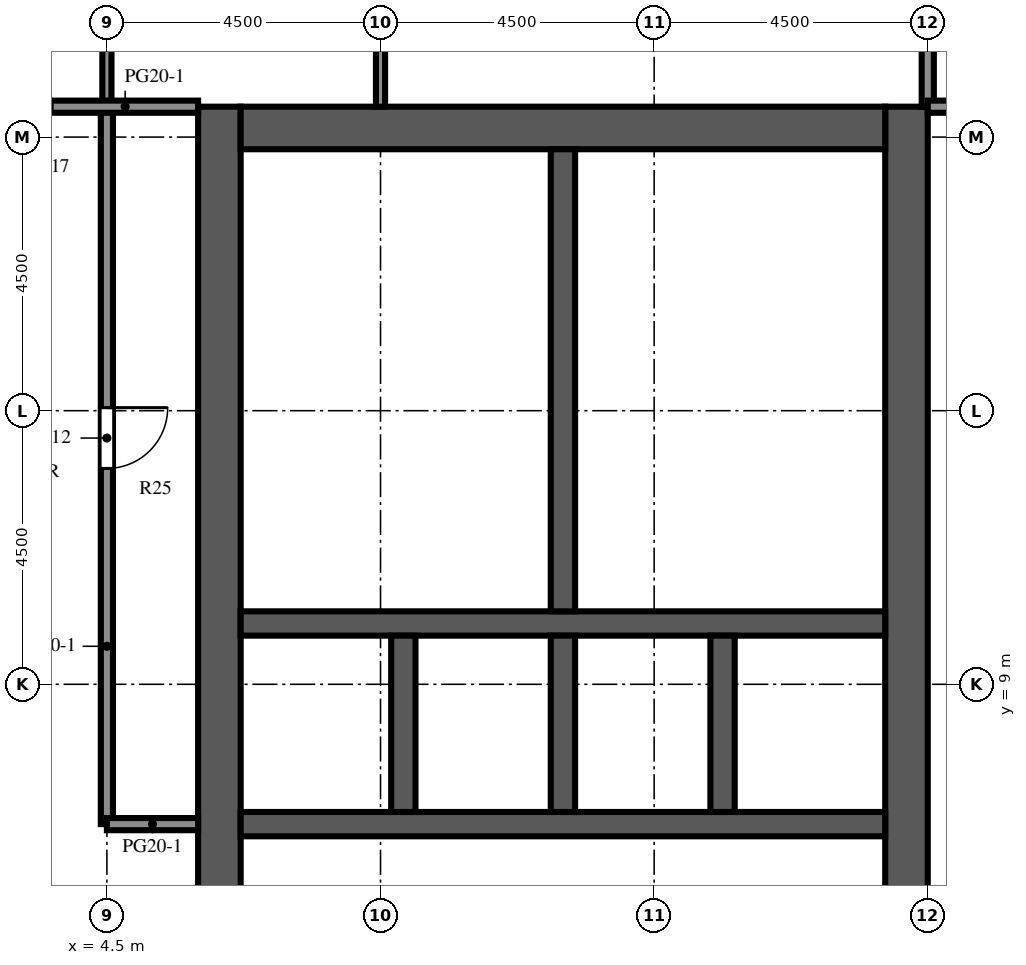
"""IFC4 building model, lengths in metres.
Left out: names, types, materials, properties, quantities, classifications, styles, units other than length and angle.
Written with IfcOpenShell. Run it as: python <this file> out.ifc"""

import sys

from ifc_helpers import new_model, si_unit, direction, frame, frame_2d, origin, place, context, subcontext, project, spatial, rectangle, extrude, element, fill, save


model = new_model("IFC4")
c1 = context("Model", 3, precision=1e-05, world=origin(), true_north=direction((0.0, 1.0)))
c2 = subcontext(c1, "Body", "Model", "MODEL_VIEW")
j1 = project(units=[si_unit("LENGTHUNIT", "METRE"), si_unit("PLANEANGLEUNIT", "RADIAN")], contexts=[c1])
p1 = place(None, origin())
s1 = spatial("IfcSite", under=j1, at=p1, CompositionType="ELEMENT")
p2 = place(p1, origin())
s2 = spatial("IfcBuilding", under=s1, at=p2, CompositionType="ELEMENT")
p3 = place(p2, frame((0.0, 0.0, 266.3)))
s3 = spatial("IfcBuildingStorey", under=s2, at=p3, CompositionType="ELEMENT", Elevation=266.3)
p4 = place(p3, frame((6.35, -9.0, 0.0), z_axis=(0.0, 0.0, 1.0), x_axis=(0.0, 1.0, 0.0)))
e1 = element("IfcWall", 1, at=p4, inside=s3, PredefinedType="SHEAR", context=c2, shape_type="SweptSolid", body=[
    extrude(rectangle(XDim=27.5, YDim=0.7, at=frame_2d((13.75, 0.0))), origin(), (0.0, 0.0, 1.0), 4.1),
])
p5 = place(p4, frame((12.55, 0.0, 0.0)))
e2 = element("IfcOpeningElement", 2, at=p5, cuts=e1, PredefinedType="OPENING", context=c2, shape_type="SweptSolid", body=[
    extrude(rectangle(XDim=2.4, YDim=2.4, at=frame_2d((1.2, 1.2))), frame((0.0, 0.36, 0.0), z_axis=(0.0, -1.0, 0.0), x_axis=(1.0, 0.0, 0.0)), (0.0, 0.0, 1.0), 0.72),
])
p6 = place(p4, frame((3.788, 0.0, 0.0)))
e3 = element("IfcOpeningElement", 3, at=p6, cuts=e1, PredefinedType="OPENING", context=c2, shape_type="SweptSolid", body=[
    extrude(rectangle(XDim=0.968, YDim=2.1, at=frame_2d((0.484, 1.05))), frame((0.0, 0.36, 0.0), z_axis=(0.0, -1.0, 0.0), x_axis=(1.0, 0.0, 0.0)), (0.0, 0.0, 1.0), 0.72),
])
p7 = place(p4, frame((23.54, 0.0, 0.0)))
e4 = element("IfcOpeningElement", 4, at=p7, cuts=e1, PredefinedType="OPENING", context=c2, shape_type="SweptSolid", body=[
    extrude(rectangle(XDim=1.2, YDim=2.1, at=frame_2d((0.6, 1.05))), frame((0.0, 0.36, 0.0), z_axis=(0.0, -1.0, 0.0), x_axis=(1.0, 0.0, 0.0)), (0.0, 0.0, 1.0), 0.72),
])
p8 = place(p3, frame((17.65, -9.0, 0.0), z_axis=(0.0, 0.0, 1.0), x_axis=(0.0, 1.0, 0.0)))
e5 = element("IfcWall", 5, at=p8, inside=s3, PredefinedType="SHEAR", context=c2, shape_type="SweptSolid", body=[
    extrude(rectangle(XDim=27.5, YDim=0.7, at=frame_2d((13.75, 0.0))), origin(), (0.0, 0.0, 1.0), 4.1),
])
p9 = place(p8, frame((12.55, 0.0, 0.0)))
e6 = element("IfcOpeningElement", 6, at=p9, cuts=e5, PredefinedType="OPENING", context=c2, shape_type="SweptSolid", body=[
    extrude(rectangle(XDim=2.4, YDim=2.4, at=frame_2d((1.2, 1.2))), frame((0.0, 0.36, 0.0), z_axis=(0.0, -1.0, 0.0), x_axis=(1.0, 0.0, 0.0)), (0.0, 0.0, 1.0), 0.72),
])
p10 = place(p8, frame((6.825, 0.0, 0.0)))
e7 = element("IfcOpeningElement", 7, at=p10, cuts=e5, PredefinedType="OPENING", context=c2, shape_type="SweptSolid", body=[
    extrude(rectangle(XDim=1.2, YDim=2.1, at=frame_2d((0.6, 1.05))), frame((0.0, 0.36, 0.0), z_axis=(0.0, -1.0, 0.0), x_axis=(1.0, 0.0, 0.0)), (0.0, 0.0, 1.0), 0.72),
])
p11 = place(p8, frame((19.475, 0.0, 0.0)))
e8 = element("IfcOpeningElement", 8, at=p11, cuts=e5, PredefinedType="OPENING", context=c2, shape_type="SweptSolid", body=[
    extrude(rectangle(XDim=1.2, YDim=2.1, at=frame_2d((0.6, 1.05))), frame((0.0, 0.36, 0.0), z_axis=(0.0, -1.0, 0.0), x_axis=(1.0, 0.0, 0.0)), (0.0, 0.0, 1.0), 0.72),
])
p12 = place(p3, frame((6.7, 18.15, 0.0), z_axis=(0.0, 0.0, 1.0), x_axis=(1.0, 0.0, 0.0)))
e9 = element("IfcWall", 9, at=p12, inside=s3, PredefinedType="SHEAR", context=c2, shape_type="SweptSolid", body=[
    extrude(rectangle(XDim=10.6, YDim=0.7, at=frame_2d((5.3, 0.0))), origin(), (0.0, 0.0, 1.0), 4.1),
])
p13 = place(p3, frame((6.7, 6.7, 0.0), z_axis=(0.0, 0.0, 1.0), x_axis=(1.0, 0.0, 0.0)))
e10 = element("IfcWall", 10, at=p13, inside=s3, PredefinedType="SHEAR", context=c2, shape_type="SweptSolid", body=[
    extrude(rectangle(XDim=10.6, YDim=0.4, at=frame_2d((5.3, 0.0))), origin(), (0.0, 0.0, 1.0), 4.1),
])
p14 = place(p13, frame((3.438, 0.0, 0.0)))
e11 = element("IfcOpeningElement", 11, at=p14, cuts=e10, PredefinedType="OPENING", context=c2, shape_type="SweptSolid", body=[
    extrude(rectangle(XDim=1.1, YDim=2.1, at=frame_2d((0.55, 1.05))), frame((0.0, 0.21, 0.0), z_axis=(0.0, -1.0, 0.0), x_axis=(1.0, 0.0, 0.0)), (0.0, 0.0, 1.0), 0.42),
])
p15 = place(p13, frame((6.062, 0.0, 0.0)))
e12 = element("IfcOpeningElement", 12, at=p15, cuts=e10, PredefinedType="OPENING", context=c2, shape_type="SweptSolid", body=[
    extrude(rectangle(XDim=1.1, YDim=2.1, at=frame_2d((0.55, 1.05))), frame((0.0, 0.21, 0.0), z_axis=(0.0, -1.0, 0.0), x_axis=(1.0, 0.0, 0.0)), (0.0, 0.0, 1.0), 0.42),
])
p16 = place(p13, frame((8.812, 0.0, 0.0)))
e13 = element("IfcOpeningElement", 13, at=p16, cuts=e10, PredefinedType="OPENING", context=c2, shape_type="SweptSolid", body=[
    extrude(rectangle(XDim=1.1, YDim=2.1, at=frame_2d((0.55, 1.05))), frame((0.0, 0.21, 0.0), z_axis=(0.0, -1.0, 0.0), x_axis=(1.0, 0.0, 0.0)), (0.0, 0.0, 1.0), 0.42),
])
p17 = place(p13, frame((0.738, 0.0, 0.0)))
e14 = element("IfcOpeningElement", 14, at=p17, cuts=e10, PredefinedType="OPENING", context=c2, shape_type="SweptSolid", body=[
    extrude(rectangle(XDim=1.0, YDim=2.1, at=frame_2d((0.5, 1.05))), frame((0.0, 0.21, 0.0), z_axis=(0.0, -1.0, 0.0), x_axis=(1.0, 0.0, 0.0)), (0.0, 0.0, 1.0), 0.42),
])
p18 = place(p3, frame((6.7, 10.0, 0.0), z_axis=(0.0, 0.0, 1.0), x_axis=(1.0, 0.0, 0.0)))
e15 = element("IfcWall", 15, at=p18, inside=s3, PredefinedType="SHEAR", context=c2, shape_type="SweptSolid", body=[
    extrude(rectangle(XDim=10.6, YDim=0.4, at=frame_2d((5.3, 0.0))), origin(), (0.0, 0.0, 1.0), 4.1),
])
for number, where, z_axis, x_axis in (
    (16, (9.375, 6.9, 0.0), (0.0, 0.0, 1.0), (0.0, 1.0, 0.0)),
    (17, (12.0, 6.9, 0.0), (0.0, 0.0, 1.0), (0.0, 1.0, 0.0)),
    (18, (14.625, 6.9, 0.0), (0.0, 0.0, 1.0), (0.0, 1.0, 0.0)),
):
    element("IfcWall", number, at=place(p3, frame(where, z_axis=z_axis, x_axis=x_axis)), inside=s3, PredefinedType="SHEAR", context=c2, shape_type="SweptSolid", body=[
        extrude(rectangle(XDim=2.9, YDim=0.4, at=frame_2d((1.45, 0.0))), origin(), (0.0, 0.0, 1.0), 4.1),
    ])
p19 = place(p3, frame((12.0, 10.2, 0.0), z_axis=(0.0, 0.0, 1.0), x_axis=(0.0, 1.0, 0.0)))
e19 = element("IfcWall", 19, at=p19, inside=s3, PredefinedType="SHEAR", context=c2, shape_type="SweptSolid", body=[
    extrude(rectangle(XDim=7.6, YDim=0.4, at=frame_2d((3.8, 0.0))), origin(), (0.0, 0.0, 1.0), 4.1),
])
p20 = place(p3, frame((6.7, 12.48, 0.0), z_axis=(0.0, 0.0, 1.0), x_axis=(1.0, 0.0, 0.0)))
e20 = element("IfcWall", 20, at=p20, inside=s3, PredefinedType="PARTITIONING", context=c2, shape_type="SweptSolid", body=[
    extrude(rectangle(XDim=1.3, YDim=0.1, at=frame_2d((0.65, 0.0))), origin(), (0.0, 0.0, 1.0), 3.65),
])
p21 = place(p20, frame((0.2, 0.0, 0.0)))
e21 = element("IfcOpeningElement", 21, at=p21, cuts=e20, PredefinedType="OPENING", context=c2, shape_type="SweptSolid", body=[
    extrude(rectangle(XDim=0.9, YDim=2.1, at=frame_2d((0.45, 1.05))), frame((0.0, 0.06, 0.0), z_axis=(0.0, -1.0, 0.0), x_axis=(1.0, 0.0, 0.0)), (0.0, 0.0, 1.0), 0.12),
])
p22 = place(p3, frame((8.0, 12.48, 0.0), z_axis=(0.0, 0.0, 1.0), x_axis=(1.0, 0.0, 0.0)))
e22 = element("IfcWall", 22, at=p22, inside=s3, PredefinedType="PARTITIONING", context=c2, shape_type="SweptSolid", body=[
    extrude(rectangle(XDim=3.8, YDim=0.1, at=frame_2d((1.9, 0.0))), origin(), (0.0, 0.0, 1.0), 3.65),
])
p23 = place(p3, frame((8.0, 12.48, 0.0), z_axis=(0.0, 0.0, 1.0), x_axis=(0.0, 1.0, 0.0)))
e23 = element("IfcWall", 23, at=p23, inside=s3, PredefinedType="PARTITIONING", context=c2, shape_type="SweptSolid", body=[
    extrude(rectangle(XDim=2.66, YDim=0.1, at=frame_2d((1.33, 0.0))), origin(), (0.0, 0.0, 1.0), 3.65),
])
p24 = place(p23, frame((0.83, 0.0, 0.0)))
e24 = element("IfcOpeningElement", 24, at=p24, cuts=e23, PredefinedType="OPENING", context=c2, shape_type="SweptSolid", body=[
    extrude(rectangle(XDim=1.0, YDim=2.1, at=frame_2d((0.5, 1.05))), frame((0.0, 0.06, 0.0), z_axis=(0.0, -1.0, 0.0), x_axis=(1.0, 0.0, 0.0)), (0.0, 0.0, 1.0), 0.12),
])
p25 = place(p3, frame((8.0, 15.14, 0.0), z_axis=(0.0, 0.0, 1.0), x_axis=(0.0, 1.0, 0.0)))
e25 = element("IfcWall", 25, at=p25, inside=s3, PredefinedType="PARTITIONING", context=c2, shape_type="SweptSolid", body=[
    extrude(rectangle(XDim=2.66, YDim=0.1, at=frame_2d((1.33, 0.0))), origin(), (0.0, 0.0, 1.0), 3.65),
])
p26 = place(p25, frame((0.83, 0.0, 0.0)))
e26 = element("IfcOpeningElement", 26, at=p26, cuts=e25, PredefinedType="OPENING", context=c2, shape_type="SweptSolid", body=[
    extrude(rectangle(XDim=1.0, YDim=2.1, at=frame_2d((0.5, 1.05))), frame((0.0, 0.06, 0.0), z_axis=(0.0, -1.0, 0.0), x_axis=(1.0, 0.0, 0.0)), (0.0, 0.0, 1.0), 0.12),
])
p27 = place(p3, frame((8.0, 15.14, 0.0), z_axis=(0.0, 0.0, 1.0), x_axis=(1.0, 0.0, 0.0)))
e27 = element("IfcWall", 27, at=p27, inside=s3, PredefinedType="PARTITIONING", context=c2, shape_type="SweptSolid", body=[
    extrude(rectangle(XDim=3.8, YDim=0.1, at=frame_2d((1.9, 0.0))), origin(), (0.0, 0.0, 1.0), 3.65),
])
p28 = place(p3, frame((4.5, 26.6, 0.0), z_axis=(0.0, 0.0, 1.0), x_axis=(0.0, -1.0, 0.0)))
e28 = element("IfcWall", 28, at=p28, inside=s3, PredefinedType="PARTITIONING", context=c2, shape_type="SweptSolid", body=[
    extrude(rectangle(XDim=8.1, YDim=0.15, at=frame_2d((4.05, 0.0))), origin(), (0.0, 0.0, 1.0), 3.65),
])
p29 = place(p28, frame((3.5, 0.0, 0.0)))
e29 = element("IfcOpeningElement", 29, at=p29, cuts=e28, PredefinedType="OPENING", context=c2, shape_type="SweptSolid", body=[
    extrude(rectangle(XDim=1.0, YDim=2.1, at=frame_2d((0.5, 1.05))), frame((0.0, 0.085, 0.0), z_axis=(0.0, -1.0, 0.0), x_axis=(1.0, 0.0, 0.0)), (0.0, 0.0, 1.0), 0.17),
])
p30 = place(p3, frame((4.5, 18.5, 0.0), z_axis=(0.0, 0.0, 1.0), x_axis=(0.0, -1.0, 0.0)))
e30 = element("IfcWall", 30, at=p30, inside=s3, PredefinedType="PARTITIONING", context=c2, shape_type="SweptSolid", body=[
    extrude(rectangle(XDim=11.8, YDim=0.2, at=frame_2d((5.9, 0.0))), origin(), (0.0, 0.0, 1.0), 3.65),
])
p31 = place(p30, frame((4.95, 0.0, 0.0)))
e31 = element("IfcOpeningElement", 31, at=p31, cuts=e30, PredefinedType="OPENING", context=c2, shape_type="SweptSolid", body=[
    extrude(rectangle(XDim=1.0, YDim=2.1, at=frame_2d((0.5, 1.05))), frame((0.0, 0.11, 0.0), z_axis=(0.0, -1.0, 0.0), x_axis=(1.0, 0.0, 0.0)), (0.0, 0.0, 1.0), 0.22),
])
p32 = place(p3, frame((9.0, 18.5, 0.0), z_axis=(0.0, 0.0, 1.0), x_axis=(0.0, 1.0, 0.0)))
e32 = element("IfcWall", 32, at=p32, inside=s3, PredefinedType="PARTITIONING", context=c2, shape_type="SweptSolid", body=[
    extrude(rectangle(XDim=3.5, YDim=0.15, at=frame_2d((1.75, 0.0))), origin(), (0.0, 0.0, 1.0), 3.65),
])
p33 = place(p3, frame((18.0, 18.5, 0.0), z_axis=(0.0, 0.0, 1.0), x_axis=(0.0, 1.0, 0.0)))
e33 = element("IfcWall", 33, at=p33, inside=s3, PredefinedType="PARTITIONING", context=c2, shape_type="SweptSolid", body=[
    extrude(rectangle(XDim=3.5, YDim=0.2, at=frame_2d((1.75, 0.0))), origin(), (0.0, 0.0, 1.0), 3.65),
])
p34 = place(p3, frame((4.5, 6.7, 0.0), z_axis=(0.0, 0.0, 1.0), x_axis=(1.0, 0.0, 0.0)))
e34 = element("IfcWall", 34, at=p34, inside=s3, PredefinedType="PARTITIONING", context=c2, shape_type="SweptSolid", body=[
    extrude(rectangle(XDim=1.5, YDim=0.2, at=frame_2d((0.75, 0.0))), origin(), (0.0, 0.0, 1.0), 3.65),
])
p35 = place(p3, frame((1.5, 18.5, 0.0), z_axis=(0.0, 0.0, 1.0), x_axis=(1.0, 0.0, 0.0)))
e35 = element("IfcWall", 35, at=p35, inside=s3, PredefinedType="PARTITIONING", context=c2, shape_type="SweptSolid", body=[
    extrude(rectangle(XDim=4.5, YDim=0.2, at=frame_2d((2.25, 0.0))), origin(), (0.0, 0.0, 1.0), 3.65),
])
p36 = place(p35, frame((1.1, 0.0, 0.0)))
e36 = element("IfcOpeningElement", 36, at=p36, cuts=e35, PredefinedType="OPENING", context=c2, shape_type="SweptSolid", body=[
    extrude(rectangle(XDim=1.0, YDim=2.1, at=frame_2d((0.5, 1.05))), frame((0.0, 0.11, 0.0), z_axis=(0.0, -1.0, 0.0), x_axis=(1.0, 0.0, 0.0)), (0.0, 0.0, 1.0), 0.22),
])
p37 = place(p3, frame((18.0, 18.5, 0.0), z_axis=(0.0, 0.0, 1.0), x_axis=(1.0, 0.0, 0.0)))
e37 = element("IfcWall", 37, at=p37, inside=s3, PredefinedType="PARTITIONING", context=c2, shape_type="SweptSolid", body=[
    extrude(rectangle(XDim=4.201, YDim=0.2, at=frame_2d((2.101, 0.0))), origin(), (0.0, 0.0, 1.0), 3.65),
])
p38 = place(p37, frame((1.6, 0.0, 0.0)))
e38 = element("IfcOpeningElement", 38, at=p38, cuts=e37, PredefinedType="OPENING", context=c2, shape_type="SweptSolid", body=[
    extrude(rectangle(XDim=1.0, YDim=2.1, at=frame_2d((0.5, 1.05))), frame((0.0, 0.11, 0.0), z_axis=(0.0, -1.0, 0.0), x_axis=(1.0, 0.0, 0.0)), (0.0, 0.0, 1.0), 0.22),
])
p39 = place(p14, origin())
e39 = element("IfcDoor", 39, at=p39, inside=s3, OperationType="DOUBLE_DOOR_SLIDING", PredefinedType="DOOR", context=c2, shape_type="SweptSolid", body=[
    extrude(rectangle(XDim=1.1, YDim=2.1, at=frame_2d((0.55, 1.05))), frame((0.0, 0.025, 0.0), z_axis=(0.0, -1.0, 0.0), x_axis=(1.0, 0.0, 0.0)), (0.0, 0.0, 1.0), 0.05),
])
fill(e11, e39)
p40 = place(p15, origin())
e40 = element("IfcDoor", 40, at=p40, inside=s3, OperationType="DOUBLE_DOOR_SLIDING", PredefinedType="DOOR", context=c2, shape_type="SweptSolid", body=[
    extrude(rectangle(XDim=1.1, YDim=2.1, at=frame_2d((0.55, 1.05))), frame((0.0, 0.025, 0.0), z_axis=(0.0, -1.0, 0.0), x_axis=(1.0, 0.0, 0.0)), (0.0, 0.0, 1.0), 0.05),
])
fill(e12, e40)
p41 = place(p16, origin())
e41 = element("IfcDoor", 41, at=p41, inside=s3, OperationType="DOUBLE_DOOR_SLIDING", PredefinedType="DOOR", context=c2, shape_type="SweptSolid", body=[
    extrude(rectangle(XDim=1.1, YDim=2.1, at=frame_2d((0.55, 1.05))), frame((0.0, 0.025, 0.0), z_axis=(0.0, -1.0, 0.0), x_axis=(1.0, 0.0, 0.0)), (0.0, 0.0, 1.0), 0.05),
])
fill(e13, e41)
p42 = place(p5, origin())
e42 = element("IfcDoor", 42, at=p42, inside=s3, OperationType="DOUBLE_DOOR_DOUBLE_SWING", PredefinedType="DOOR", context=c2, shape_type="SweptSolid", body=[
    extrude(rectangle(XDim=2.4, YDim=2.4, at=frame_2d((1.2, 1.2))), frame((0.0, 0.025, 0.0), z_axis=(0.0, -1.0, 0.0), x_axis=(1.0, 0.0, 0.0)), (0.0, 0.0, 1.0), 0.05),
])
fill(e2, e42)
p43 = place(p9, origin())
e43 = element("IfcDoor", 43, at=p43, inside=s3, OperationType="DOUBLE_DOOR_DOUBLE_SWING", PredefinedType="DOOR", context=c2, shape_type="SweptSolid", body=[
    extrude(rectangle(XDim=2.4, YDim=2.4, at=frame_2d((1.2, 1.2))), frame((0.0, 0.025, 0.0), z_axis=(0.0, -1.0, 0.0), x_axis=(1.0, 0.0, 0.0)), (0.0, 0.0, 1.0), 0.05),
])
fill(e6, e43)
p44 = place(p11, frame((1.2, 0.0, 0.0), z_axis=(0.0, 0.0, 1.0), x_axis=(-1.0, 0.0, 0.0)))
e44 = element("IfcDoor", 44, at=p44, inside=s3, OperationType="SINGLE_SWING_LEFT", PredefinedType="DOOR", context=c2, shape_type="SweptSolid", body=[
    extrude(rectangle(XDim=1.2, YDim=2.1, at=frame_2d((0.6, 1.05))), frame((0.0, 0.025, 0.0), z_axis=(0.0, -1.0, 0.0), x_axis=(1.0, 0.0, 0.0)), (0.0, 0.0, 1.0), 0.05),
])
fill(e8, e44)
p45 = place(p17, origin())
e45 = element("IfcDoor", 45, at=p45, inside=s3, OperationType="SINGLE_SWING_LEFT", PredefinedType="DOOR", context=c2, shape_type="SweptSolid", body=[
    extrude(rectangle(XDim=1.0, YDim=2.1, at=frame_2d((0.5, 1.05))), frame((0.0, 0.025, 0.0), z_axis=(0.0, -1.0, 0.0), x_axis=(1.0, 0.0, 0.0)), (0.0, 0.0, 1.0), 0.05),
])
fill(e14, e45)
p46 = place(p21, origin())
e46 = element("IfcDoor", 46, at=p46, inside=s3, OperationType="SINGLE_SWING_RIGHT", PredefinedType="DOOR", context=c2, shape_type="SweptSolid", body=[
    extrude(rectangle(XDim=0.9, YDim=2.1, at=frame_2d((0.45, 1.05))), frame((0.0, 0.025, 0.0), z_axis=(0.0, -1.0, 0.0), x_axis=(1.0, 0.0, 0.0)), (0.0, 0.0, 1.0), 0.05),
])
fill(e21, e46)
p47 = place(p7, origin())
e47 = element("IfcDoor", 47, at=p47, inside=s3, OperationType="SINGLE_SWING_LEFT", PredefinedType="DOOR", context=c2, shape_type="SweptSolid", body=[
    extrude(rectangle(XDim=1.2, YDim=2.1, at=frame_2d((0.6, 1.05))), frame((0.0, -0.275, 0.0), z_axis=(0.0, -1.0, 0.0), x_axis=(1.0, 0.0, 0.0)), (0.0, 0.0, 1.0), 0.05),
])
fill(e4, e47)
p48 = place(p24, origin())
e48 = element("IfcDoor", 48, at=p48, inside=s3, OperationType="SINGLE_SWING_RIGHT", PredefinedType="DOOR", context=c2, shape_type="SweptSolid", body=[
    extrude(rectangle(XDim=1.0, YDim=2.1, at=frame_2d((0.5, 1.05))), frame((0.0, 0.025, 0.0), z_axis=(0.0, -1.0, 0.0), x_axis=(1.0, 0.0, 0.0)), (0.0, 0.0, 1.0), 0.05),
])
fill(e24, e48)
p49 = place(p26, origin())
e49 = element("IfcDoor", 49, at=p49, inside=s3, OperationType="SINGLE_SWING_LEFT", PredefinedType="DOOR", context=c2, shape_type="SweptSolid", body=[
    extrude(rectangle(XDim=1.0, YDim=2.1, at=frame_2d((0.5, 1.05))), frame((0.0, 0.025, 0.0), z_axis=(0.0, -1.0, 0.0), x_axis=(1.0, 0.0, 0.0)), (0.0, 0.0, 1.0), 0.05),
])
fill(e26, e49)
p50 = place(p31, origin())
e50 = element("IfcDoor", 50, at=p50, inside=s3, OperationType="SINGLE_SWING_LEFT", PredefinedType="DOOR", context=c2, shape_type="SweptSolid", body=[
    extrude(rectangle(XDim=1.0, YDim=2.1, at=frame_2d((0.5, 1.05))), frame((0.0, 0.025, 0.0), z_axis=(0.0, -1.0, 0.0), x_axis=(1.0, 0.0, 0.0)), (0.0, 0.0, 1.0), 0.05),
])
fill(e31, e50)
save(model, sys.argv[1])
